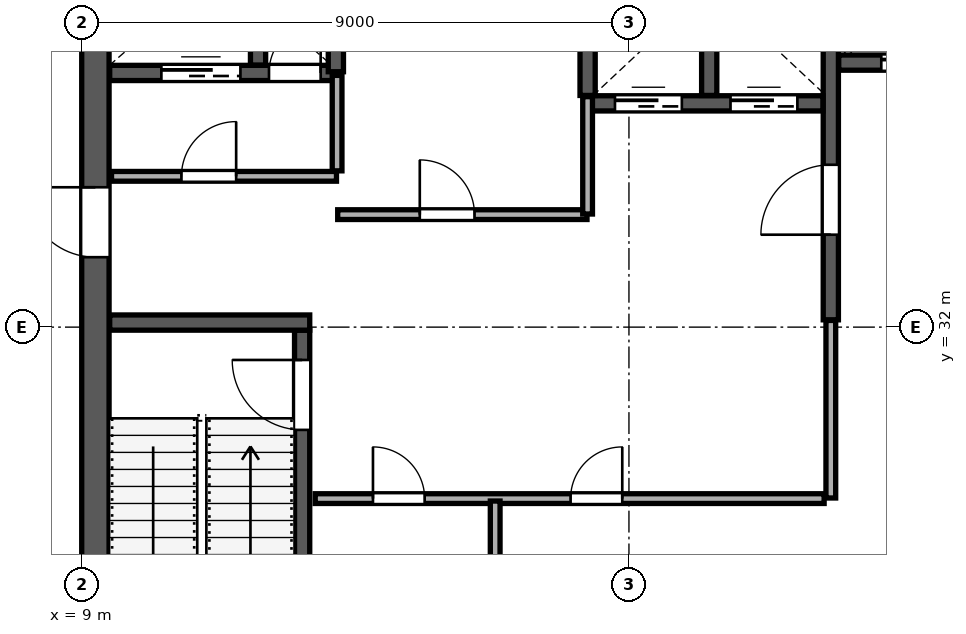
"""IFC4 building model, lengths in metres.
Left out: names, types, materials, properties, quantities, classifications, styles, units other than length and angle.
Written with IfcOpenShell. Run it as: python <this file> out.ifc"""

import sys

from ifc_helpers import new_model, si_unit, direction, frame, frame_2d, origin, place, context, subcontext, project, spatial, rectangle, extrude, source, transform, mapped, element, fill, save


model = new_model("IFC4")
c1 = context("Model", 3, precision=1e-05, world=origin(), true_north=direction((0.0, 1.0)))
c2 = subcontext(c1, "Body", "Model", "MODEL_VIEW")
j1 = project(units=[si_unit("LENGTHUNIT", "METRE"), si_unit("PLANEANGLEUNIT", "RADIAN")], contexts=[c1])
p1 = place(None, origin())
s1 = spatial("IfcSite", under=j1, at=p1, CompositionType="ELEMENT")
p2 = place(p1, origin())
s2 = spatial("IfcBuilding", under=s1, at=p2, CompositionType="ELEMENT")
p3 = place(p2, frame((0.0, 0.0, 266.8)))
s3 = spatial("IfcBuildingStorey", under=s2, at=p3, CompositionType="ELEMENT", Elevation=266.8)
p4 = place(p3, frame((9.225, 24.45, 0.0), z_axis=(0.0, 0.0, 1.0), x_axis=(0.0, 1.0, 0.0)))
e1 = element("IfcWall", 1, at=p4, inside=s3, PredefinedType="SHEAR", context=c2, shape_type="SweptSolid", body=[
    extrude(rectangle(XDim=15.1, YDim=0.45, at=frame_2d((7.55, 0.0))), origin(), (0.0, 0.0, 1.0), 3.96),
])
p5 = place(p4, frame((8.7, 0.0, 0.0)))
e2 = element("IfcOpeningElement", 2, at=p5, cuts=e1, PredefinedType="OPENING", context=c2, shape_type="SweptSolid", body=[
    extrude(rectangle(XDim=1.15, YDim=2.2, at=frame_2d((0.575, 1.1))), frame((0.0, 0.235, 0.0), z_axis=(0.0, -1.0, 0.0), x_axis=(1.0, 0.0, 0.0)), (0.0, 0.0, 1.0), 0.47),
])
p6 = place(p3, frame((12.625, 24.46, 0.0), z_axis=(0.0, 0.0, 1.0), x_axis=(0.0, 1.0, 0.0)))
e3 = element("IfcWall", 3, at=p6, inside=s3, PredefinedType="SHEAR", context=c2, shape_type="SweptSolid", body=[
    extrude(rectangle(XDim=7.49, YDim=0.25, at=frame_2d((3.745, 0.0))), origin(), (0.0, 0.0, 1.0), 3.96),
])
p7 = place(p6, frame((5.85, 0.0, 0.0)))
e4 = element("IfcOpeningElement", 4, at=p7, cuts=e3, PredefinedType="OPENING", context=c2, shape_type="SweptSolid", body=[
    extrude(rectangle(XDim=1.15, YDim=2.2, at=frame_2d((0.575, 1.1))), frame((0.0, 0.135, 0.0), z_axis=(0.0, -1.0, 0.0), x_axis=(1.0, 0.0, 0.0)), (0.0, 0.0, 1.0), 0.27),
])
p8 = place(p3, frame((9.46, 32.075, 0.0), z_axis=(0.0, 0.0, 1.0), x_axis=(1.0, 0.0, 0.0)))
e5 = element("IfcWall", 5, at=p8, inside=s3, PredefinedType="SHEAR", context=c2, shape_type="SweptSolid", body=[
    extrude(rectangle(XDim=3.29, YDim=0.25, at=frame_2d((1.645, 0.0))), origin(), (0.0, 0.0, 1.0), 3.96),
])
p9 = place(p3, frame((21.32, 32.12, 0.0), z_axis=(0.0, 0.0, 1.0), x_axis=(0.0, 1.0, 0.0)))
e6 = element("IfcWall", 6, at=p9, inside=s3, PredefinedType="SHEAR", context=c2, shape_type="SweptSolid", body=[
    extrude(rectangle(XDim=7.42, YDim=0.25, at=frame_2d((3.71, 0.0))), origin(), (0.0, 0.0, 1.0), 3.96),
])
p10 = place(p9, frame((1.4, 0.0, 0.0)))
e7 = element("IfcOpeningElement", 7, at=p10, cuts=e6, PredefinedType="OPENING", context=c2, shape_type="SweptSolid", body=[
    extrude(rectangle(XDim=1.15, YDim=2.2, at=frame_2d((0.575, 1.1))), frame((0.0, 0.135, 0.0), z_axis=(0.0, -1.0, 0.0), x_axis=(1.0, 0.0, 0.0)), (0.0, 0.0, 1.0), 0.27),
])
p11 = place(p3, frame((9.46, 36.18, 0.0), z_axis=(0.0, 0.0, 1.0), x_axis=(1.0, 0.0, 0.0)))
e8 = element("IfcWall", 8, at=p11, inside=s3, PredefinedType="SHEAR", context=c2, shape_type="SweptSolid", body=[
    extrude(rectangle(XDim=3.79, YDim=0.25, at=frame_2d((1.895, 0.0))), origin(), (0.0, 0.0, 1.0), 3.96),
])
p12 = place(p11, frame((2.62, 0.0, 0.0)))
e9 = element("IfcOpeningElement", 9, at=p12, cuts=e8, PredefinedType="OPENING", context=c2, shape_type="SweptSolid", body=[
    extrude(rectangle(XDim=0.85, YDim=2.1, at=frame_2d((0.425, 1.05))), frame((0.0, 0.135, 0.0), z_axis=(0.0, -1.0, 0.0), x_axis=(1.0, 0.0, 0.0)), (0.0, 0.0, 1.0), 0.27),
])
p13 = place(p11, frame((0.85, 0.0, 0.0)))
e10 = element("IfcOpeningElement", 10, at=p13, cuts=e8, PredefinedType="OPENING", context=c2, shape_type="SweptSolid", body=[
    extrude(rectangle(XDim=1.3, YDim=2.25, at=frame_2d((0.65, 1.125))), frame((0.0, 0.135, 0.0), z_axis=(0.0, -1.0, 0.0), x_axis=(1.0, 0.0, 0.0)), (0.0, 0.0, 1.0), 0.27),
])
p14 = place(p3, frame((11.9, 36.31, 0.0), z_axis=(0.0, 0.0, 1.0), x_axis=(0.0, 1.0, 0.0)))
e11 = element("IfcWall", 11, at=p14, inside=s3, PredefinedType="SHEAR", context=c2, shape_type="SweptSolid", body=[
    extrude(rectangle(XDim=3.23, YDim=0.25, at=frame_2d((1.615, 0.0))), origin(), (0.0, 0.0, 1.0), 3.96),
])
p15 = place(p3, frame((21.45, 36.35, 0.0), z_axis=(0.0, 0.0, 1.0), x_axis=(1.0, 0.0, 0.0)))
e12 = element("IfcWall", 12, at=p15, inside=s3, PredefinedType="SHEAR", context=c2, shape_type="SweptSolid", body=[
    extrude(rectangle(XDim=5.09, YDim=0.25, at=frame_2d((2.545, 0.0))), origin(), (0.0, 0.0, 1.0), 3.96),
])
p16 = place(p15, frame((0.7, 0.0, 0.0)))
e13 = element("IfcOpeningElement", 13, at=p16, cuts=e12, PredefinedType="OPENING", context=c2, shape_type="SweptSolid", body=[
    extrude(rectangle(XDim=1.2, YDim=2.2, at=frame_2d((0.6, 1.1))), frame((0.0, 0.135, 0.0), z_axis=(0.0, -1.0, 0.0), x_axis=(1.0, 0.0, 0.0)), (0.0, 0.0, 1.0), 0.27),
])
p17 = place(p15, frame((3.25, 0.0, 0.0)))
e14 = element("IfcOpeningElement", 14, at=p17, cuts=e12, PredefinedType="OPENING", context=c2, shape_type="SweptSolid", body=[
    extrude(rectangle(XDim=1.2, YDim=2.2, at=frame_2d((0.6, 1.1))), frame((0.0, 0.135, 0.0), z_axis=(0.0, -1.0, 0.0), x_axis=(1.0, 0.0, 0.0)), (0.0, 0.0, 1.0), 0.27),
])
p18 = place(p3, frame((13.18, 36.2, 0.0), z_axis=(0.0, 0.0, 1.0), x_axis=(0.0, 1.0, 0.0)))
e15 = element("IfcWall", 15, at=p18, inside=s3, PredefinedType="SHEAR", context=c2, shape_type="SweptSolid", body=[
    extrude(rectangle(XDim=3.34, YDim=0.25, at=frame_2d((1.67, 0.0))), origin(), (0.0, 0.0, 1.0), 3.96),
])
p19 = place(p3, frame((17.32, 35.68, 0.0), z_axis=(0.0, 0.0, 1.0), x_axis=(1.0, 0.0, 0.0)))
e16 = element("IfcWall", 16, at=p19, inside=s3, PredefinedType="SHEAR", context=c2, shape_type="SweptSolid", body=[
    extrude(rectangle(XDim=3.87, YDim=0.25, at=frame_2d((1.935, 0.0))), origin(), (0.0, 0.0, 1.0), 3.96),
])
p20 = place(p19, frame((0.45, 0.0, 0.0)))
e17 = element("IfcOpeningElement", 17, at=p20, cuts=e16, PredefinedType="OPENING", context=c2, shape_type="SweptSolid", body=[
    extrude(rectangle(XDim=1.1, YDim=2.2, at=frame_2d((0.55, 1.1))), frame((0.0, 0.135, 0.0), z_axis=(0.0, -1.0, 0.0), x_axis=(1.0, 0.0, 0.0)), (0.0, 0.0, 1.0), 0.27),
])
p21 = place(p19, frame((2.35, 0.0, 0.0)))
e18 = element("IfcOpeningElement", 18, at=p21, cuts=e16, PredefinedType="OPENING", context=c2, shape_type="SweptSolid", body=[
    extrude(rectangle(XDim=1.1, YDim=2.2, at=frame_2d((0.55, 1.1))), frame((0.0, 0.135, 0.0), z_axis=(0.0, -1.0, 0.0), x_axis=(1.0, 0.0, 0.0)), (0.0, 0.0, 1.0), 0.27),
])
for number, where, z_axis, x_axis in (
    (19, (17.32, 35.81, 0.0), (0.0, 0.0, 1.0), (0.0, 1.0, 0.0)),
    (20, (19.32, 35.81, 0.0), (0.0, 0.0, 1.0), (0.0, 1.0, 0.0)),
):
    element("IfcWall", number, at=place(p3, frame(where, z_axis=z_axis, x_axis=x_axis)), inside=s3, PredefinedType="SHEAR", context=c2, shape_type="SweptSolid", body=[
        extrude(rectangle(XDim=3.73, YDim=0.25, at=frame_2d((1.865, 0.0))), origin(), (0.0, 0.0, 1.0), 3.96),
    ])
p22 = place(p3, frame((9.49, 34.48, 0.0), z_axis=(0.0, 0.0, 1.0), x_axis=(1.0, 0.0, 0.0)))
e21 = element("IfcWall", 21, at=p22, inside=s3, PredefinedType="PARTITIONING", context=c2, shape_type="SweptSolid", body=[
    extrude(rectangle(XDim=3.7, YDim=0.16, at=frame_2d((1.85, 0.0))), origin(), (0.0, 0.0, 1.0), 3.96),
])
p23 = place(p22, frame((1.15, 0.0, 0.0)))
e22 = element("IfcOpeningElement", 22, at=p23, cuts=e21, PredefinedType="OPENING", context=c2, shape_type="SweptSolid", body=[
    extrude(rectangle(XDim=0.9, YDim=2.15, at=frame_2d((0.45, 1.075))), frame((0.0, 0.09, 0.0), z_axis=(0.0, -1.0, 0.0), x_axis=(1.0, 0.0, 0.0)), (0.0, 0.0, 1.0), 0.18),
])
p24 = place(p3, frame((13.2, 34.57, 0.0), z_axis=(0.0, 0.0, 1.0), x_axis=(0.0, 1.0, 0.0)))
e23 = element("IfcWall", 23, at=p24, inside=s3, PredefinedType="PARTITIONING", context=c2, shape_type="SweptSolid", body=[
    extrude(rectangle(XDim=1.57, YDim=0.16, at=frame_2d((0.785, 0.0))), origin(), (0.0, 0.0, 1.0), 3.96),
])
p25 = place(p3, frame((13.21, 33.85, 0.0), z_axis=(0.0, 0.0, 1.0), x_axis=(1.0, 0.0, 0.0)))
e24 = element("IfcWall", 24, at=p25, inside=s3, PredefinedType="PARTITIONING", context=c2, shape_type="SweptSolid", body=[
    extrude(rectangle(XDim=4.1, YDim=0.16, at=frame_2d((2.05, 0.0))), origin(), (0.0, 0.0, 1.0), 3.96),
])
p26 = place(p25, frame((1.35, 0.0, 0.0)))
e25 = element("IfcOpeningElement", 25, at=p26, cuts=e24, PredefinedType="OPENING", context=c2, shape_type="SweptSolid", body=[
    extrude(rectangle(XDim=0.9, YDim=2.15, at=frame_2d((0.45, 1.075))), frame((0.0, 0.09, 0.0), z_axis=(0.0, -1.0, 0.0), x_axis=(1.0, 0.0, 0.0)), (0.0, 0.0, 1.0), 0.18),
])
p27 = place(p3, frame((17.32, 33.86, 0.0), z_axis=(0.0, 0.0, 1.0), x_axis=(0.0, 1.0, 0.0)))
e26 = element("IfcWall", 26, at=p27, inside=s3, PredefinedType="PARTITIONING", context=c2, shape_type="SweptSolid", body=[
    extrude(rectangle(XDim=1.93, YDim=0.16, at=frame_2d((0.965, 0.0))), origin(), (0.0, 0.0, 1.0), 3.96),
])
p28 = place(p3, frame((12.84, 29.18, 0.0), z_axis=(0.0, 0.0, 1.0), x_axis=(1.0, 0.0, 0.0)))
e27 = element("IfcWall", 27, at=p28, inside=s3, PredefinedType="PARTITIONING", context=c2, shape_type="SweptSolid", body=[
    extrude(rectangle(XDim=8.37, YDim=0.16, at=frame_2d((4.185, 0.0))), origin(), (0.0, 0.0, 1.0), 3.96),
])
p29 = place(p28, frame((0.95, 0.0, 0.0)))
e28 = element("IfcOpeningElement", 28, at=p29, cuts=e27, PredefinedType="OPENING", context=c2, shape_type="SweptSolid", body=[
    extrude(rectangle(XDim=0.85, YDim=2.1, at=frame_2d((0.425, 1.05))), frame((0.0, 0.09, 0.0), z_axis=(0.0, -1.0, 0.0), x_axis=(1.0, 0.0, 0.0)), (0.0, 0.0, 1.0), 0.18),
])
p30 = place(p28, frame((4.2, 0.0, 0.0)))
e29 = element("IfcOpeningElement", 29, at=p30, cuts=e27, PredefinedType="OPENING", context=c2, shape_type="SweptSolid", body=[
    extrude(rectangle(XDim=0.85, YDim=2.1, at=frame_2d((0.425, 1.05))), frame((0.0, 0.09, 0.0), z_axis=(0.0, -1.0, 0.0), x_axis=(1.0, 0.0, 0.0)), (0.0, 0.0, 1.0), 0.18),
])
p31 = place(p3, frame((15.8, 24.54, 0.0), z_axis=(0.0, 0.0, 1.0), x_axis=(0.0, 1.0, 0.0)))
e30 = element("IfcWall", 30, at=p31, inside=s3, PredefinedType="PARTITIONING", context=c2, shape_type="SweptSolid", body=[
    extrude(rectangle(XDim=4.6, YDim=0.16, at=frame_2d((2.3, 0.0))), origin(), (0.0, 0.0, 1.0), 3.96),
])
p32 = place(p3, frame((21.32, 29.19, 0.0), z_axis=(0.0, 0.0, 1.0), x_axis=(0.0, 1.0, 0.0)))
e31 = element("IfcWall", 31, at=p32, inside=s3, PredefinedType="PARTITIONING", context=c2, shape_type="SweptSolid", body=[
    extrude(rectangle(XDim=2.92, YDim=0.16, at=frame_2d((1.46, 0.0))), origin(), (0.0, 0.0, 1.0), 3.96),
])
p33 = place(p3, frame((4.002, 29.471, 0.0), z_axis=(0.0, 0.0, 1.0), x_axis=(0.642802048813, -0.766032327021, 0.0)))
e32 = element("IfcWall", 32, at=p33, inside=s3, PredefinedType="PARTITIONING", context=c2, shape_type="SweptSolid", body=[
    extrude(rectangle(XDim=11.57, YDim=0.16, at=frame_2d((5.785, 0.0))), origin(), (0.0, 0.0, 1.0), 3.96),
])
p34 = place(p33, frame((1.15, 0.0, 0.0)))
e33 = element("IfcOpeningElement", 33, at=p34, cuts=e32, PredefinedType="OPENING", context=c2, shape_type="SweptSolid", body=[
    extrude(rectangle(XDim=0.95, YDim=2.15, at=frame_2d((0.475, 1.075))), frame((0.0, 0.09, 0.0), z_axis=(0.0, -1.0, 0.0), x_axis=(1.0, 0.0, 0.0)), (0.0, 0.0, 1.0), 0.18),
])
p35 = place(p3, frame((19.528, 51.245, 0.0), z_axis=(0.0, 0.0, 1.0), x_axis=(0.642782364439, -0.766048844374, 0.0)))
e34 = element("IfcWall", 34, at=p35, inside=s3, PredefinedType="PARTITIONING", context=c2, shape_type="SweptSolid", body=[
    extrude(rectangle(XDim=27.34, YDim=0.135, at=frame_2d((13.67, 0.0))), origin(), (0.0, 0.0, 1.0), 3.96),
])
p36 = place(p35, frame((10.8, 0.0, 0.0)))
e35 = element("IfcOpeningElement", 35, at=p36, cuts=e34, PredefinedType="OPENING", context=c2, shape_type="SweptSolid", body=[
    extrude(rectangle(XDim=0.95, YDim=2.15, at=frame_2d((0.475, 1.075))), frame((0.0, 0.078, 0.0), z_axis=(0.0, -1.0, 0.0), x_axis=(1.0, 0.0, 0.0)), (0.0, 0.0, 1.0), 0.155),
])
p37 = place(p3, frame((0.849, 35.624, 0.0), z_axis=(0.0, 0.0, 1.0), x_axis=(0.766042777978, 0.642789594119, 0.0)))
e36 = element("IfcWall", 36, at=p37, inside=s3, PredefinedType="PARTITIONING", context=c2, shape_type="SweptSolid", body=[
    extrude(rectangle(XDim=29.51, YDim=0.1, at=frame_2d((14.755, 0.0))), origin(), (0.0, 0.0, 1.0), 3.96),
])
p38 = place(p37, frame((2.6, 0.0, 0.0)))
e37 = element("IfcOpeningElement", 37, at=p38, cuts=e36, PredefinedType="OPENING", context=c2, shape_type="SweptSolid", body=[
    extrude(rectangle(XDim=0.95, YDim=2.15, at=frame_2d((0.475, 1.075))), frame((0.0, 0.06, 0.0), z_axis=(0.0, -1.0, 0.0), x_axis=(1.0, 0.0, 0.0)), (0.0, 0.0, 1.0), 0.12),
])
m1 = source(origin(), c2, "Body", "SweptSolid", [
    extrude(rectangle(XDim=1.15, YDim=2.2, at=frame_2d((0.575, 1.1))), frame((0.0, 0.025, 0.0), z_axis=(0.0, -1.0, 0.0), x_axis=(1.0, 0.0, 0.0)), (0.0, 0.0, 1.0), 0.05),
])
p39 = place(p7, origin())
e38 = element("IfcDoor", 38, at=p39, inside=s3, OperationType="SINGLE_SWING_RIGHT", PredefinedType="DOOR", context=c2, shape_type="MappedRepresentation", body=[
    mapped(m1, transform((0.0, 0.0, 0.0), scale=1.0)),
])
fill(e4, e38)
m2 = source(origin(), c2, "Body", "SweptSolid", [
    extrude(rectangle(XDim=1.15, YDim=2.2, at=frame_2d((0.575, 1.1))), frame((0.0, 0.025, 0.0), z_axis=(0.0, -1.0, 0.0), x_axis=(1.0, 0.0, 0.0)), (0.0, 0.0, 1.0), 0.05),
])
p40 = place(p10, origin())
e39 = element("IfcDoor", 39, at=p40, inside=s3, OperationType="SINGLE_SWING_LEFT", PredefinedType="DOOR", context=c2, shape_type="MappedRepresentation", body=[
    mapped(m2, transform((0.0, 0.0, 0.0), scale=1.0)),
])
fill(e7, e39)
p41 = place(p5, origin())
e40 = element("IfcDoor", 40, at=p41, inside=s3, OperationType="SINGLE_SWING_RIGHT", PredefinedType="DOOR", context=c2, shape_type="MappedRepresentation", body=[
    mapped(m2, transform((0.0, 0.0, 0.0), scale=1.0)),
])
fill(e2, e40)
m3 = source(origin(), c2, "Body", "SweptSolid", [
    extrude(rectangle(XDim=0.85, YDim=2.1, at=frame_2d((0.425, 1.05))), frame((0.0, 0.025, 0.0), z_axis=(0.0, -1.0, 0.0), x_axis=(1.0, 0.0, 0.0)), (0.0, 0.0, 1.0), 0.05),
])
p42 = place(p12, origin())
e41 = element("IfcDoor", 41, at=p42, inside=s3, OperationType="SINGLE_SWING_RIGHT", PredefinedType="DOOR", context=c2, shape_type="MappedRepresentation", body=[
    mapped(m3, transform((0.0, 0.0, 0.0), scale=1.0)),
])
fill(e9, e41)
m4 = source(origin(), c2, "Body", "SweptSolid", [
    extrude(rectangle(XDim=1.1, YDim=2.2, at=frame_2d((0.55, 1.1))), frame((0.0, 0.025, 0.0), z_axis=(0.0, -1.0, 0.0), x_axis=(1.0, 0.0, 0.0)), (0.0, 0.0, 1.0), 0.05),
])
p43 = place(p20, origin())
e42 = element("IfcDoor", 42, at=p43, inside=s3, OperationType="SLIDING_TO_LEFT", PredefinedType="DOOR", context=c2, shape_type="MappedRepresentation", body=[
    mapped(m4, transform((0.0, 0.0, 0.0), scale=1.0)),
])
fill(e17, e42)
p44 = place(p21, origin())
e43 = element("IfcDoor", 43, at=p44, inside=s3, OperationType="SLIDING_TO_RIGHT", PredefinedType="DOOR", context=c2, shape_type="MappedRepresentation", body=[
    mapped(m4, transform((0.0, 0.0, 0.0), scale=1.0)),
])
fill(e18, e43)
m5 = source(origin(), c2, "Body", "SweptSolid", [
    extrude(rectangle(XDim=1.2, YDim=2.2, at=frame_2d((0.6, 1.1))), frame((0.0, 0.025, 0.0), z_axis=(0.0, -1.0, 0.0), x_axis=(1.0, 0.0, 0.0)), (0.0, 0.0, 1.0), 0.05),
])
p45 = place(p16, origin())
e44 = element("IfcDoor", 44, at=p45, inside=s3, OperationType="SLIDING_TO_LEFT", PredefinedType="DOOR", context=c2, shape_type="MappedRepresentation", body=[
    mapped(m5, transform((0.0, 0.0, 0.0), scale=1.0)),
])
fill(e13, e44)
m6 = source(origin(), c2, "Body", "SweptSolid", [
    extrude(rectangle(XDim=1.3, YDim=2.25, at=frame_2d((0.65, 1.125))), frame((0.0, 0.025, 0.0), z_axis=(0.0, -1.0, 0.0), x_axis=(1.0, 0.0, 0.0)), (0.0, 0.0, 1.0), 0.05),
])
p46 = place(p13, origin())
e45 = element("IfcDoor", 45, at=p46, inside=s3, OperationType="SLIDING_TO_LEFT", PredefinedType="DOOR", context=c2, shape_type="MappedRepresentation", body=[
    mapped(m6, transform((0.0, 0.0, 0.0), scale=1.0)),
])
fill(e10, e45)
m7 = source(origin(), c2, "Body", "SweptSolid", [
    extrude(rectangle(XDim=0.9, YDim=2.15, at=frame_2d((0.45, 1.075))), frame((0.0, 0.025, 0.0), z_axis=(0.0, -1.0, 0.0), x_axis=(1.0, 0.0, 0.0)), (0.0, 0.0, 1.0), 0.05),
])
p47 = place(p23, origin())
e46 = element("IfcDoor", 46, at=p47, inside=s3, OperationType="SINGLE_SWING_RIGHT", PredefinedType="DOOR", context=c2, shape_type="MappedRepresentation", body=[
    mapped(m7, transform((0.0, 0.0, 0.0), scale=1.0)),
])
fill(e22, e46)
p48 = place(p26, origin())
e47 = element("IfcDoor", 47, at=p48, inside=s3, OperationType="SINGLE_SWING_LEFT", PredefinedType="DOOR", context=c2, shape_type="MappedRepresentation", body=[
    mapped(m7, transform((0.0, 0.0, 0.0), scale=1.0)),
])
fill(e25, e47)
p49 = place(p29, origin())
e48 = element("IfcDoor", 48, at=p49, inside=s3, OperationType="SINGLE_SWING_LEFT", PredefinedType="DOOR", context=c2, shape_type="MappedRepresentation", body=[
    mapped(m3, transform((0.0, 0.0, 0.0), scale=1.0)),
])
fill(e28, e48)
p50 = place(p30, origin())
e49 = element("IfcDoor", 49, at=p50, inside=s3, OperationType="SINGLE_SWING_RIGHT", PredefinedType="DOOR", context=c2, shape_type="MappedRepresentation", body=[
    mapped(m3, transform((0.0, 0.0, 0.0), scale=1.0)),
])
fill(e29, e49)
save(model, sys.argv[1])
